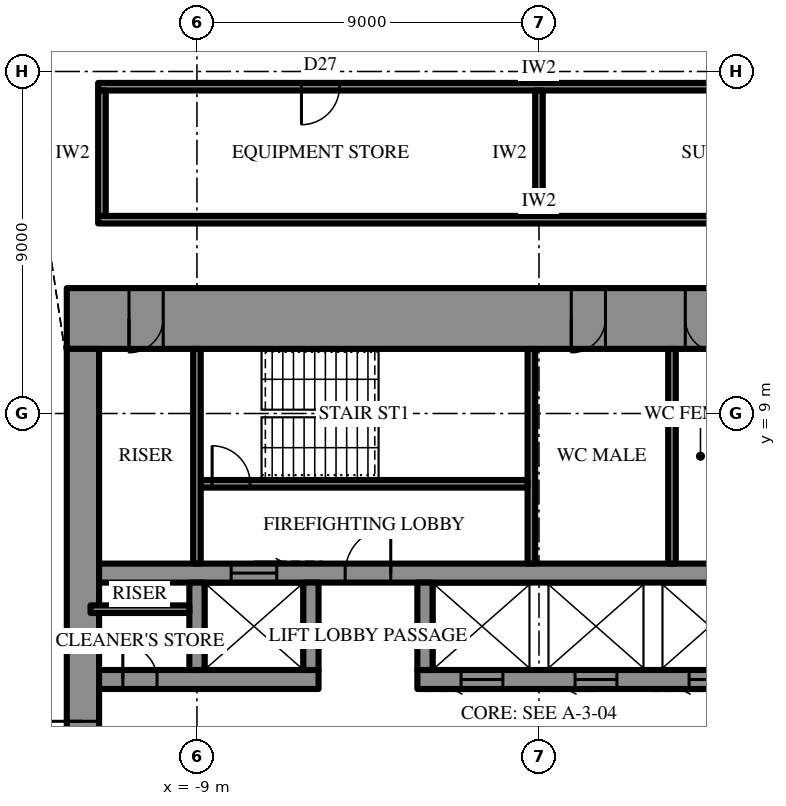
"""IFC4 building model, lengths in metres.
Left out: names, types, materials, properties, quantities, classifications, styles, units other than length and angle.
Written with IfcOpenShell. Run it as: python <this file> out.ifc"""

import sys

from ifc_helpers import new_model, si_unit, direction, frame, frame_2d, origin, place, context, subcontext, project, spatial, rectangle, extrude, element, fill, save


model = new_model("IFC4")
c1 = context("Model", 3, precision=1e-05, world=origin(), true_north=direction((0.0, 1.0)))
c2 = subcontext(c1, "Body", "Model", "MODEL_VIEW")
j1 = project(units=[si_unit("LENGTHUNIT", "METRE"), si_unit("PLANEANGLEUNIT", "RADIAN")], contexts=[c1])
p1 = place(None, origin())
s1 = spatial("IfcSite", under=j1, at=p1, CompositionType="ELEMENT")
p2 = place(p1, origin())
s2 = spatial("IfcBuilding", under=s1, at=p2, CompositionType="ELEMENT")
p3 = place(p2, frame((0.0, 0.0, 361.9)))
s3 = spatial("IfcBuildingStorey", under=s2, at=p3, CompositionType="ELEMENT", Elevation=361.9)
p4 = place(p3, frame((-12.425, 11.5, 0.0), z_axis=(0.0, 0.0, 1.0), x_axis=(1.0, 0.0, 0.0)))
e1 = element("IfcWall", 1, at=p4, inside=s3, PredefinedType="SHEAR", context=c2, shape_type="SweptSolid", body=[
    extrude(rectangle(XDim=24.85, YDim=1.6, at=frame_2d((12.425, 0.0))), origin(), (0.0, 0.0, 1.0), 4.2),
])
p5 = place(p4, frame((13.275, 0.0, 0.0)))
e2 = element("IfcOpeningElement", 2, at=p5, cuts=e1, PredefinedType="OPENING", context=c2, shape_type="SweptSolid", body=[
    extrude(rectangle(XDim=0.9, YDim=2.2, at=frame_2d((0.45, 1.1))), frame((0.0, 0.81, 0.0), z_axis=(0.0, -1.0, 0.0), x_axis=(1.0, 0.0, 0.0)), (0.0, 0.0, 1.0), 1.62),
])
p6 = place(p4, frame((16.275, 0.0, 0.0)))
e3 = element("IfcOpeningElement", 3, at=p6, cuts=e1, PredefinedType="OPENING", context=c2, shape_type="SweptSolid", body=[
    extrude(rectangle(XDim=0.9, YDim=2.2, at=frame_2d((0.45, 1.1))), frame((0.0, 0.81, 0.0), z_axis=(0.0, -1.0, 0.0), x_axis=(1.0, 0.0, 0.0)), (0.0, 0.0, 1.0), 1.62),
])
p7 = place(p4, frame((19.325, 0.0, 0.0)))
e4 = element("IfcOpeningElement", 4, at=p7, cuts=e1, PredefinedType="OPENING", context=c2, shape_type="SweptSolid", body=[
    extrude(rectangle(XDim=1.0, YDim=2.2, at=frame_2d((0.5, 1.1))), frame((0.0, 0.81, 0.0), z_axis=(0.0, -1.0, 0.0), x_axis=(1.0, 0.0, 0.0)), (0.0, 0.0, 1.0), 1.62),
])
p8 = place(p4, frame((1.637, 0.0, 0.0)))
e5 = element("IfcOpeningElement", 5, at=p8, cuts=e1, PredefinedType="OPENING", context=c2, shape_type="SweptSolid", body=[
    extrude(rectangle(XDim=0.9, YDim=2.2, at=frame_2d((0.45, 1.1))), frame((0.0, 0.81, 0.0), z_axis=(0.0, -1.0, 0.0), x_axis=(1.0, 0.0, 0.0)), (0.0, 0.0, 1.0), 1.62),
])
p9 = place(p4, frame((22.312, 0.0, 0.0)))
e6 = element("IfcOpeningElement", 6, at=p9, cuts=e1, PredefinedType="OPENING", context=c2, shape_type="SweptSolid", body=[
    extrude(rectangle(XDim=0.9, YDim=2.2, at=frame_2d((0.45, 1.1))), frame((0.0, 0.81, 0.0), z_axis=(0.0, -1.0, 0.0), x_axis=(1.0, 0.0, 0.0)), (0.0, 0.0, 1.0), 1.62),
])
p10 = place(p3, frame((-12.0, 10.7, 0.0), z_axis=(0.0, 0.0, 1.0), x_axis=(0.0, -1.0, 0.0)))
e7 = element("IfcWall", 7, at=p10, inside=s3, PredefinedType="SHEAR", context=c2, shape_type="SweptSolid", body=[
    extrude(rectangle(XDim=21.4, YDim=0.85, at=frame_2d((10.7, 0.0))), origin(), (0.0, 0.0, 1.0), 4.2),
])
p11 = place(p10, frame((9.8, 0.0, 0.0)))
e8 = element("IfcOpeningElement", 8, at=p11, cuts=e7, PredefinedType="OPENING", context=c2, shape_type="SweptSolid", body=[
    extrude(rectangle(XDim=1.8, YDim=2.4, at=frame_2d((0.9, 1.2))), frame((0.0, 0.435, 0.0), z_axis=(0.0, -1.0, 0.0), x_axis=(1.0, 0.0, 0.0)), (0.0, 0.0, 1.0), 0.87),
])
p12 = place(p3, frame((-11.575, 2.0, 0.0), z_axis=(0.0, 0.0, 1.0), x_axis=(1.0, 0.0, 0.0)))
e9 = element("IfcWall", 9, at=p12, inside=s3, PredefinedType="SHEAR", context=c2, shape_type="SweptSolid", body=[
    extrude(rectangle(XDim=5.775, YDim=0.5, at=frame_2d((2.887, 0.0))), origin(), (0.0, 0.0, 1.0), 4.2),
])
p13 = place(p12, frame((0.625, 0.0, 0.0)))
e10 = element("IfcOpeningElement", 10, at=p13, cuts=e9, PredefinedType="OPENING", context=c2, shape_type="SweptSolid", body=[
    extrude(rectangle(XDim=0.9, YDim=2.2, at=frame_2d((0.45, 1.1))), frame((0.0, 0.26, 0.0), z_axis=(0.0, -1.0, 0.0), x_axis=(1.0, 0.0, 0.0)), (0.0, 0.0, 1.0), 0.52),
])
p14 = place(p3, frame((-3.2, 2.0, 0.0), z_axis=(0.0, 0.0, 1.0), x_axis=(1.0, 0.0, 0.0)))
e11 = element("IfcWall", 11, at=p14, inside=s3, PredefinedType="SHEAR", context=c2, shape_type="SweptSolid", body=[
    extrude(rectangle(XDim=14.775, YDim=0.5, at=frame_2d((7.387, 0.0))), origin(), (0.0, 0.0, 1.0), 4.2),
])
p15 = place(p14, frame((13.25, 0.0, 0.0)))
e12 = element("IfcOpeningElement", 12, at=p15, cuts=e11, PredefinedType="OPENING", context=c2, shape_type="SweptSolid", body=[
    extrude(rectangle(XDim=0.9, YDim=2.2, at=frame_2d((0.45, 1.1))), frame((0.0, 0.26, 0.0), z_axis=(0.0, -1.0, 0.0), x_axis=(1.0, 0.0, 0.0)), (0.0, 0.0, 1.0), 0.52),
])
p16 = place(p14, frame((1.15, 0.0, 0.0)))
e13 = element("IfcOpeningElement", 13, at=p16, cuts=e11, PredefinedType="OPENING", context=c2, shape_type="SweptSolid", body=[
    extrude(rectangle(XDim=1.1, YDim=2.2, at=frame_2d((0.55, 1.1))), frame((0.0, 0.26, 0.0), z_axis=(0.0, -1.0, 0.0), x_axis=(1.0, 0.0, 0.0)), (0.0, 0.0, 1.0), 0.52),
])
p17 = place(p14, frame((4.15, 0.0, 0.0)))
e14 = element("IfcOpeningElement", 14, at=p17, cuts=e11, PredefinedType="OPENING", context=c2, shape_type="SweptSolid", body=[
    extrude(rectangle(XDim=1.1, YDim=2.2, at=frame_2d((0.55, 1.1))), frame((0.0, 0.26, 0.0), z_axis=(0.0, -1.0, 0.0), x_axis=(1.0, 0.0, 0.0)), (0.0, 0.0, 1.0), 0.52),
])
p18 = place(p14, frame((7.15, 0.0, 0.0)))
e15 = element("IfcOpeningElement", 15, at=p18, cuts=e11, PredefinedType="OPENING", context=c2, shape_type="SweptSolid", body=[
    extrude(rectangle(XDim=1.1, YDim=2.2, at=frame_2d((0.55, 1.1))), frame((0.0, 0.26, 0.0), z_axis=(0.0, -1.0, 0.0), x_axis=(1.0, 0.0, 0.0)), (0.0, 0.0, 1.0), 0.52),
])
p19 = place(p14, frame((10.15, 0.0, 0.0)))
e16 = element("IfcOpeningElement", 16, at=p19, cuts=e11, PredefinedType="OPENING", context=c2, shape_type="SweptSolid", body=[
    extrude(rectangle(XDim=1.1, YDim=2.2, at=frame_2d((0.55, 1.1))), frame((0.0, 0.26, 0.0), z_axis=(0.0, -1.0, 0.0), x_axis=(1.0, 0.0, 0.0)), (0.0, 0.0, 1.0), 0.52),
])
p20 = place(p3, frame((-11.575, 4.8, 0.0), z_axis=(0.0, 0.0, 1.0), x_axis=(1.0, 0.0, 0.0)))
e17 = element("IfcWall", 17, at=p20, inside=s3, PredefinedType="SHEAR", context=c2, shape_type="SweptSolid", body=[
    extrude(rectangle(XDim=23.15, YDim=0.5, at=frame_2d((11.575, 0.0))), origin(), (0.0, 0.0, 1.0), 4.2),
])
p21 = place(p20, frame((6.475, 0.0, 0.0)))
e18 = element("IfcOpeningElement", 18, at=p21, cuts=e17, PredefinedType="OPENING", context=c2, shape_type="SweptSolid", body=[
    extrude(rectangle(XDim=1.2, YDim=2.2, at=frame_2d((0.6, 1.1))), frame((0.0, 0.26, 0.0), z_axis=(0.0, -1.0, 0.0), x_axis=(1.0, 0.0, 0.0)), (0.0, 0.0, 1.0), 0.52),
])
p22 = place(p20, frame((3.475, 0.0, 0.0)))
e19 = element("IfcOpeningElement", 19, at=p22, cuts=e17, PredefinedType="OPENING", context=c2, shape_type="SweptSolid", body=[
    extrude(rectangle(XDim=1.2, YDim=2.2, at=frame_2d((0.6, 1.1))), frame((0.0, 0.26, 0.0), z_axis=(0.0, -1.0, 0.0), x_axis=(1.0, 0.0, 0.0)), (0.0, 0.0, 1.0), 0.52),
])
for number, where, z_axis, x_axis in (
    (20, (-9.0, 2.25, 0.0), (0.0, 0.0, 1.0), (0.0, 1.0, 0.0)),
    (21, (-6.0, 2.25, 0.0), (0.0, 0.0, 1.0), (0.0, 1.0, 0.0)),
    (22, (-3.0, 2.25, 0.0), (0.0, 0.0, 1.0), (0.0, 1.0, 0.0)),
):
    element("IfcWall", number, at=place(p3, frame(where, z_axis=z_axis, x_axis=x_axis)), inside=s3, PredefinedType="SHEAR", context=c2, shape_type="SweptSolid", body=[
        extrude(rectangle(XDim=2.3, YDim=0.4, at=frame_2d((1.15, 0.0))), origin(), (0.0, 0.0, 1.0), 4.2),
    ])
p23 = place(p3, frame((-0.2, 5.05, 0.0), z_axis=(0.0, 0.0, 1.0), x_axis=(0.0, 1.0, 0.0)))
e23 = element("IfcWall", 23, at=p23, inside=s3, PredefinedType="SHEAR", context=c2, shape_type="SweptSolid", body=[
    extrude(rectangle(XDim=5.65, YDim=0.2, at=frame_2d((2.825, 0.0))), origin(), (0.0, 0.0, 1.0), 4.2),
])
p24 = place(p3, frame((-8.9, 7.15, 0.0), z_axis=(0.0, 0.0, 1.0), x_axis=(1.0, 0.0, 0.0)))
e24 = element("IfcWall", 24, at=p24, inside=s3, PredefinedType="SHEAR", context=c2, shape_type="SweptSolid", body=[
    extrude(rectangle(XDim=8.6, YDim=0.2, at=frame_2d((4.3, 0.0))), origin(), (0.0, 0.0, 1.0), 4.2),
])
p25 = place(p24, frame((0.3, 0.0, 0.0)))
e25 = element("IfcOpeningElement", 25, at=p25, cuts=e24, PredefinedType="OPENING", context=c2, shape_type="SweptSolid", body=[
    extrude(rectangle(XDim=1.0, YDim=2.2, at=frame_2d((0.5, 1.1))), frame((0.0, 0.11, 0.0), z_axis=(0.0, -1.0, 0.0), x_axis=(1.0, 0.0, 0.0)), (0.0, 0.0, 1.0), 0.22),
])
for number, where, z_axis, x_axis in (
    (26, (-9.0, 5.05, 0.0), (0.0, 0.0, 1.0), (0.0, 1.0, 0.0)),
    (27, (3.5, 5.05, 0.0), (0.0, 0.0, 1.0), (0.0, 1.0, 0.0)),
):
    element("IfcWall", number, at=place(p3, frame(where, z_axis=z_axis, x_axis=x_axis)), inside=s3, PredefinedType="PARTITIONING", context=c2, shape_type="SweptSolid", body=[
        extrude(rectangle(XDim=5.65, YDim=0.2, at=frame_2d((2.825, 0.0))), origin(), (0.0, 0.0, 1.0), 4.0),
    ])
p26 = place(p3, frame((-11.8, 3.85, 0.0), z_axis=(0.0, 0.0, 1.0), x_axis=(1.0, 0.0, 0.0)))
e28 = element("IfcWall", 28, at=p26, inside=s3, PredefinedType="PARTITIONING", context=c2, shape_type="SweptSolid", body=[
    extrude(rectangle(XDim=2.6, YDim=0.2, at=frame_2d((1.3, 0.0))), origin(), (0.0, 0.0, 1.0), 4.0),
])
p27 = place(p3, frame((-11.6, 14.1, 0.0), z_axis=(0.0, 0.0, 1.0), x_axis=(1.0, 0.0, 0.0)))
e29 = element("IfcWall", 29, at=p27, inside=s3, PredefinedType="PARTITIONING", context=c2, shape_type="SweptSolid", body=[
    extrude(rectangle(XDim=23.2, YDim=0.2, at=frame_2d((11.6, 0.0))), origin(), (0.0, 0.0, 1.0), 4.0),
])
p28 = place(p3, frame((-11.6, 17.6, 0.0), z_axis=(0.0, 0.0, 1.0), x_axis=(1.0, 0.0, 0.0)))
e30 = element("IfcWall", 30, at=p28, inside=s3, PredefinedType="PARTITIONING", context=c2, shape_type="SweptSolid", body=[
    extrude(rectangle(XDim=23.2, YDim=0.2, at=frame_2d((11.6, 0.0))), origin(), (0.0, 0.0, 1.0), 4.0),
])
p29 = place(p28, frame((5.35, 0.0, 0.0)))
e31 = element("IfcOpeningElement", 31, at=p29, cuts=e30, PredefinedType="OPENING", context=c2, shape_type="SweptSolid", body=[
    extrude(rectangle(XDim=1.0, YDim=2.2, at=frame_2d((0.5, 1.1))), frame((0.0, 0.11, 0.0), z_axis=(0.0, -1.0, 0.0), x_axis=(1.0, 0.0, 0.0)), (0.0, 0.0, 1.0), 0.22),
])
p30 = place(p28, frame((16.85, 0.0, 0.0)))
e32 = element("IfcOpeningElement", 32, at=p30, cuts=e30, PredefinedType="OPENING", context=c2, shape_type="SweptSolid", body=[
    extrude(rectangle(XDim=1.0, YDim=2.2, at=frame_2d((0.5, 1.1))), frame((0.0, 0.11, 0.0), z_axis=(0.0, -1.0, 0.0), x_axis=(1.0, 0.0, 0.0)), (0.0, 0.0, 1.0), 0.22),
])
p31 = place(p3, frame((-11.5, 14.2, 0.0), z_axis=(0.0, 0.0, 1.0), x_axis=(0.0, 1.0, 0.0)))
e33 = element("IfcWall", 33, at=p31, inside=s3, PredefinedType="PARTITIONING", context=c2, shape_type="SweptSolid", body=[
    extrude(rectangle(XDim=3.3, YDim=0.2, at=frame_2d((1.65, 0.0))), origin(), (0.0, 0.0, 1.0), 4.0),
])
p32 = place(p3, frame((0.0, 14.2, 0.0), z_axis=(0.0, 0.0, 1.0), x_axis=(0.0, 1.0, 0.0)))
e34 = element("IfcWall", 34, at=p32, inside=s3, PredefinedType="PARTITIONING", context=c2, shape_type="SweptSolid", body=[
    extrude(rectangle(XDim=3.3, YDim=0.2, at=frame_2d((1.65, 0.0))), origin(), (0.0, 0.0, 1.0), 2.992),
])
p33 = place(p11, frame((1.8, 0.0, 0.0), z_axis=(0.0, 0.0, 1.0), x_axis=(-1.0, 0.0, 0.0)))
e35 = element("IfcDoor", 35, at=p33, inside=s3, OperationType="DOUBLE_DOOR_SINGLE_SWING", PredefinedType="DOOR", context=c2, shape_type="SweptSolid", body=[
    extrude(rectangle(XDim=1.8, YDim=2.4, at=frame_2d((0.9, 1.2))), frame((0.0, 0.025, 0.0), z_axis=(0.0, -1.0, 0.0), x_axis=(1.0, 0.0, 0.0)), (0.0, 0.0, 1.0), 0.05),
])
fill(e8, e35)
p34 = place(p21, origin())
e36 = element("IfcDoor", 36, at=p34, inside=s3, OperationType="SINGLE_SWING_LEFT", PredefinedType="DOOR", context=c2, shape_type="SweptSolid", body=[
    extrude(rectangle(XDim=1.2, YDim=2.2, at=frame_2d((0.6, 1.1))), frame((0.0, 0.025, 0.0), z_axis=(0.0, -1.0, 0.0), x_axis=(1.0, 0.0, 0.0)), (0.0, 0.0, 1.0), 0.05),
])
fill(e18, e36)
p35 = place(p25, origin())
e37 = element("IfcDoor", 37, at=p35, inside=s3, OperationType="SINGLE_SWING_RIGHT", PredefinedType="DOOR", context=c2, shape_type="SweptSolid", body=[
    extrude(rectangle(XDim=1.0, YDim=2.2, at=frame_2d((0.5, 1.1))), frame((0.0, 0.025, 0.0), z_axis=(0.0, -1.0, 0.0), x_axis=(1.0, 0.0, 0.0)), (0.0, 0.0, 1.0), 0.05),
])
fill(e25, e37)
p36 = place(p5, frame((0.9, 0.0, 0.0), z_axis=(0.0, 0.0, 1.0), x_axis=(-1.0, 0.0, 0.0)))
e38 = element("IfcDoor", 38, at=p36, inside=s3, OperationType="SINGLE_SWING_LEFT", PredefinedType="DOOR", context=c2, shape_type="SweptSolid", body=[
    extrude(rectangle(XDim=0.9, YDim=2.2, at=frame_2d((0.45, 1.1))), frame((0.0, 0.025, 0.0), z_axis=(0.0, -1.0, 0.0), x_axis=(1.0, 0.0, 0.0)), (0.0, 0.0, 1.0), 0.05),
])
fill(e2, e38)
p37 = place(p6, frame((0.9, 0.0, 0.0), z_axis=(0.0, 0.0, 1.0), x_axis=(-1.0, 0.0, 0.0)))
e39 = element("IfcDoor", 39, at=p37, inside=s3, OperationType="SINGLE_SWING_RIGHT", PredefinedType="DOOR", context=c2, shape_type="SweptSolid", body=[
    extrude(rectangle(XDim=0.9, YDim=2.2, at=frame_2d((0.45, 1.1))), frame((0.0, 0.025, 0.0), z_axis=(0.0, -1.0, 0.0), x_axis=(1.0, 0.0, 0.0)), (0.0, 0.0, 1.0), 0.05),
])
fill(e3, e39)
p38 = place(p8, frame((0.9, 0.0, 0.0), z_axis=(0.0, 0.0, 1.0), x_axis=(-1.0, 0.0, 0.0)))
e40 = element("IfcDoor", 40, at=p38, inside=s3, OperationType="SINGLE_SWING_LEFT", PredefinedType="DOOR", context=c2, shape_type="SweptSolid", body=[
    extrude(rectangle(XDim=0.9, YDim=2.2, at=frame_2d((0.45, 1.1))), frame((0.0, 0.025, 0.0), z_axis=(0.0, -1.0, 0.0), x_axis=(1.0, 0.0, 0.0)), (0.0, 0.0, 1.0), 0.05),
])
fill(e5, e40)
p39 = place(p13, origin())
e41 = element("IfcDoor", 41, at=p39, inside=s3, OperationType="SINGLE_SWING_RIGHT", PredefinedType="DOOR", context=c2, shape_type="SweptSolid", body=[
    extrude(rectangle(XDim=0.9, YDim=2.2, at=frame_2d((0.45, 1.1))), frame((0.0, 0.025, 0.0), z_axis=(0.0, -1.0, 0.0), x_axis=(1.0, 0.0, 0.0)), (0.0, 0.0, 1.0), 0.05),
])
fill(e10, e41)
p40 = place(p22, origin())
e42 = element("IfcDoor", 42, at=p40, inside=s3, OperationType="SLIDING_TO_LEFT", PredefinedType="DOOR", context=c2, shape_type="SweptSolid", body=[
    extrude(rectangle(XDim=1.2, YDim=2.2, at=frame_2d((0.6, 1.1))), frame((0.0, 0.025, 0.0), z_axis=(0.0, -1.0, 0.0), x_axis=(1.0, 0.0, 0.0)), (0.0, 0.0, 1.0), 0.05),
])
fill(e19, e42)
p41 = place(p16, frame((1.1, 0.0, 0.0), z_axis=(0.0, 0.0, 1.0), x_axis=(-1.0, 0.0, 0.0)))
e43 = element("IfcDoor", 43, at=p41, inside=s3, OperationType="SLIDING_TO_LEFT", PredefinedType="DOOR", context=c2, shape_type="SweptSolid", body=[
    extrude(rectangle(XDim=1.1, YDim=2.2, at=frame_2d((0.55, 1.1))), frame((0.0, 0.025, 0.0), z_axis=(0.0, -1.0, 0.0), x_axis=(1.0, 0.0, 0.0)), (0.0, 0.0, 1.0), 0.05),
])
fill(e13, e43)
p42 = place(p17, frame((1.1, 0.0, 0.0), z_axis=(0.0, 0.0, 1.0), x_axis=(-1.0, 0.0, 0.0)))
e44 = element("IfcDoor", 44, at=p42, inside=s3, OperationType="SLIDING_TO_LEFT", PredefinedType="DOOR", context=c2, shape_type="SweptSolid", body=[
    extrude(rectangle(XDim=1.1, YDim=2.2, at=frame_2d((0.55, 1.1))), frame((0.0, 0.025, 0.0), z_axis=(0.0, -1.0, 0.0), x_axis=(1.0, 0.0, 0.0)), (0.0, 0.0, 1.0), 0.05),
])
fill(e14, e44)
p43 = place(p18, frame((1.1, 0.0, 0.0), z_axis=(0.0, 0.0, 1.0), x_axis=(-1.0, 0.0, 0.0)))
e45 = element("IfcDoor", 45, at=p43, inside=s3, OperationType="SLIDING_TO_LEFT", PredefinedType="DOOR", context=c2, shape_type="SweptSolid", body=[
    extrude(rectangle(XDim=1.1, YDim=2.2, at=frame_2d((0.55, 1.1))), frame((0.0, 0.025, 0.0), z_axis=(0.0, -1.0, 0.0), x_axis=(1.0, 0.0, 0.0)), (0.0, 0.0, 1.0), 0.05),
])
fill(e15, e45)
p44 = place(p29, frame((1.0, 0.0, 0.0), z_axis=(0.0, 0.0, 1.0), x_axis=(-1.0, 0.0, 0.0)))
e46 = element("IfcDoor", 46, at=p44, inside=s3, OperationType="SINGLE_SWING_LEFT", PredefinedType="DOOR", context=c2, shape_type="SweptSolid", body=[
    extrude(rectangle(XDim=1.0, YDim=2.2, at=frame_2d((0.5, 1.1))), frame((0.0, 0.025, 0.0), z_axis=(0.0, -1.0, 0.0), x_axis=(1.0, 0.0, 0.0)), (0.0, 0.0, 1.0), 0.05),
])
fill(e31, e46)
save(model, sys.argv[1])
